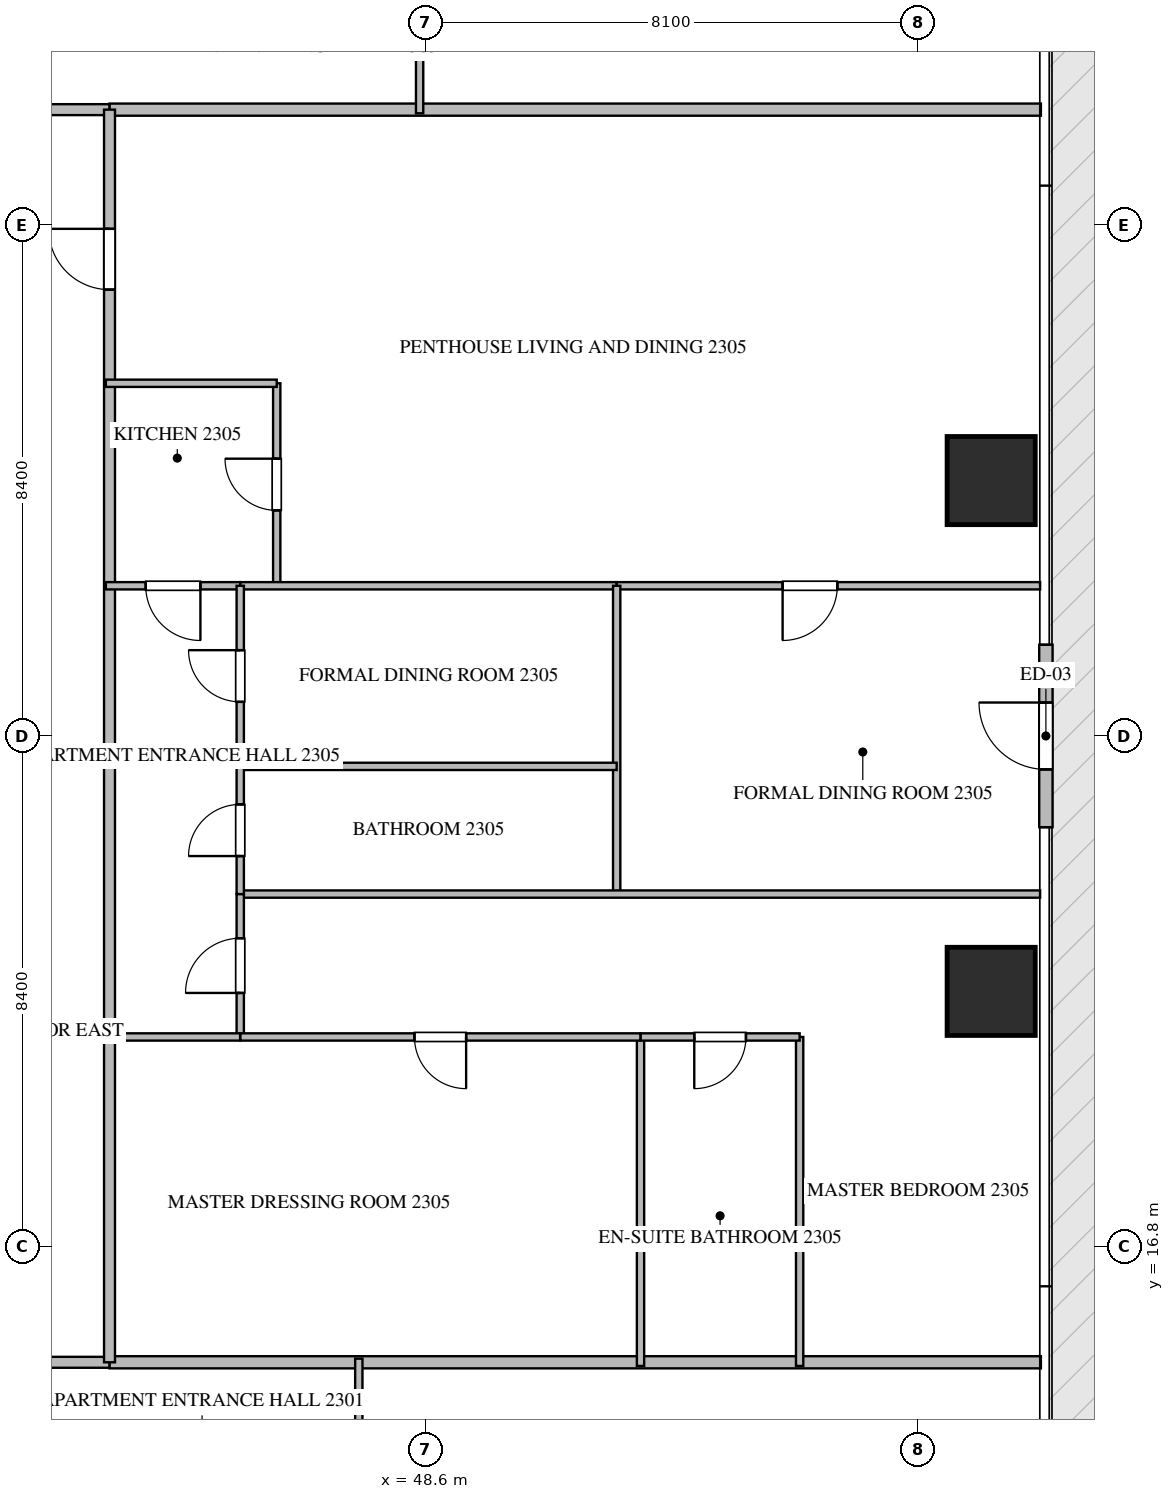
"""IFC4 building model, lengths in metres.
Left out: names, types, materials, properties, quantities, classifications, styles, units other than length and angle.
Written with IfcOpenShell. Run it as: python <this file> out.ifc"""

import sys

from ifc_helpers import new_model, si_unit, direction, frame, frame_2d, origin, origin_2d, place, context, subcontext, project, spatial, rectangle, extrude, source, transform, mapped, element, fill, save


model = new_model("IFC4")
c1 = context("Model", 3, precision=1e-05, world=origin(), true_north=direction((0.0, 1.0)))
c2 = subcontext(c1, "Body", "Model", "MODEL_VIEW")
j1 = project(units=[si_unit("LENGTHUNIT", "METRE"), si_unit("PLANEANGLEUNIT", "RADIAN")], contexts=[c1])
p1 = place(None, origin())
s1 = spatial("IfcSite", under=j1, at=p1, CompositionType="ELEMENT")
p2 = place(p1, origin())
s2 = spatial("IfcBuilding", under=s1, at=p2, CompositionType="ELEMENT")
p3 = place(p2, frame((0.0, 0.0, 94.2)))
s3 = spatial("IfcBuildingStorey", under=s2, at=p3, CompositionType="ELEMENT", Elevation=94.2)
m1 = source(origin(), c2, "Body", "SweptSolid", [
    extrude(rectangle(XDim=1.45, YDim=1.45, at=origin_2d()), origin(), (0.0, 0.0, 1.0), 3.75),
])
for number, where, z_axis, x_axis in (
    (1, (57.9, 21.0, -0.26), (0.0, 0.0, 1.0), (1.0, 0.0, 0.0)),
    (2, (57.9, 29.4, -0.26), (0.0, 0.0, 1.0), (1.0, 0.0, 0.0)),
):
    element("IfcColumn", number, at=place(p3, frame(where, z_axis=z_axis, x_axis=x_axis)), inside=s3, PredefinedType="COLUMN", context=c2, shape_type="MappedRepresentation", body=[
        mapped(m1, transform((0.0, 0.0, 0.0), scale=1.0)),
    ])
p4 = place(p3, frame((58.8, 23.7, 0.0), z_axis=(0.0, 0.0, 1.0), x_axis=(0.0, 1.0, 0.0)))
e3 = element("IfcWall", 3, at=p4, inside=s3, PredefinedType="ELEMENTEDWALL", context=c2, shape_type="SweptSolid", body=[
    extrude(rectangle(XDim=3.0, YDim=0.22, at=frame_2d((1.5, 0.0))), origin(), (0.0, 0.0, 1.0), 3.475),
])
p5 = place(p4, frame((0.95, 0.0, 0.0)))
e4 = element("IfcOpeningElement", 4, at=p5, cuts=e3, PredefinedType="OPENING", context=c2, shape_type="SweptSolid", body=[
    extrude(rectangle(XDim=1.1, YDim=2.2, at=frame_2d((0.55, 1.1))), frame((0.0, 0.12, 0.0), z_axis=(0.0, -1.0, 0.0), x_axis=(1.0, 0.0, 0.0)), (0.0, 0.0, 1.0), 0.24),
])
for number, where, z_axis, x_axis in (
    (5, (43.4, 14.9, 0.0), (0.0, 0.0, 1.0), (1.0, 0.0, 0.0)),
    (6, (43.4, 35.5, 0.0), (0.0, 0.0, 1.0), (1.0, 0.0, 0.0)),
):
    element("IfcWall", number, at=place(p3, frame(where, z_axis=z_axis, x_axis=x_axis)), inside=s3, PredefinedType="PARTITIONING", context=c2, shape_type="SweptSolid", body=[
        extrude(rectangle(XDim=15.318, YDim=0.2, at=frame_2d((7.659, 0.0))), origin(), (0.0, 0.0, 1.0), 3.49),
    ])
p6 = place(p3, frame((21.402, 14.9, 0.0), z_axis=(0.0, 0.0, 1.0), x_axis=(1.0, 0.0, 0.0)))
e7 = element("IfcWall", 7, at=p6, inside=s3, PredefinedType="PARTITIONING", context=c2, shape_type="SweptSolid", body=[
    extrude(rectangle(XDim=21.996, YDim=0.18, at=frame_2d((10.998, 0.0))), origin(), (0.0, 0.0, 1.0), 3.49),
])
p7 = place(p6, frame((15.222, 0.0, 0.0)))
e8 = element("IfcOpeningElement", 8, at=p7, cuts=e7, PredefinedType="OPENING", context=c2, shape_type="SweptSolid", body=[
    extrude(rectangle(XDim=1.0, YDim=2.15, at=frame_2d((0.5, 1.075))), frame((0.0, 0.1, 0.0), z_axis=(0.0, -1.0, 0.0), x_axis=(1.0, 0.0, 0.0)), (0.0, 0.0, 1.0), 0.2),
])
p8 = place(p3, frame((21.402, 35.5, 0.0), z_axis=(0.0, 0.0, 1.0), x_axis=(1.0, 0.0, 0.0)))
e9 = element("IfcWall", 9, at=p8, inside=s3, PredefinedType="PARTITIONING", context=c2, shape_type="SweptSolid", body=[
    extrude(rectangle(XDim=21.996, YDim=0.18, at=frame_2d((10.998, 0.0))), origin(), (0.0, 0.0, 1.0), 3.49),
])
p9 = place(p8, frame((7.454, 0.0, 0.0)))
e10 = element("IfcOpeningElement", 10, at=p9, cuts=e9, PredefinedType="OPENING", context=c2, shape_type="SweptSolid", body=[
    extrude(rectangle(XDim=1.0, YDim=2.15, at=frame_2d((0.5, 1.075))), frame((0.0, 0.1, 0.0), z_axis=(0.0, -1.0, 0.0), x_axis=(1.0, 0.0, 0.0)), (0.0, 0.0, 1.0), 0.2),
])
p10 = place(p8, frame((13.542, 0.0, 0.0)))
e11 = element("IfcOpeningElement", 11, at=p10, cuts=e9, PredefinedType="OPENING", context=c2, shape_type="SweptSolid", body=[
    extrude(rectangle(XDim=1.0, YDim=2.15, at=frame_2d((0.5, 1.075))), frame((0.0, 0.1, 0.0), z_axis=(0.0, -1.0, 0.0), x_axis=(1.0, 0.0, 0.0)), (0.0, 0.0, 1.0), 0.2),
])
p11 = place(p3, frame((43.4, 14.9, 0.0), z_axis=(0.0, 0.0, 1.0), x_axis=(0.0, 1.0, 0.0)))
e12 = element("IfcWall", 12, at=p11, inside=s3, PredefinedType="PARTITIONING", context=c2, shape_type="SweptSolid", body=[
    extrude(rectangle(XDim=20.6, YDim=0.18, at=frame_2d((10.3, 0.0))), origin(), (0.0, 0.0, 1.0), 3.49),
])
p12 = place(p11, frame((17.64, 0.0, 0.0)))
e13 = element("IfcOpeningElement", 13, at=p12, cuts=e12, PredefinedType="OPENING", context=c2, shape_type="SweptSolid", body=[
    extrude(rectangle(XDim=1.0, YDim=2.15, at=frame_2d((0.5, 1.075))), frame((0.0, 0.1, 0.0), z_axis=(0.0, -1.0, 0.0), x_axis=(1.0, 0.0, 0.0)), (0.0, 0.0, 1.0), 0.2),
])
for number, where, z_axis, x_axis in (
    (14, (47.5, 12.752, 0.0), (0.0, 0.0, 1.0), (0.0, 1.0, 0.0)),
    (15, (48.5, 37.648, 0.0), (0.0, 0.0, 1.0), (0.0, -1.0, 0.0)),
):
    element("IfcWall", number, at=place(p3, frame(where, z_axis=z_axis, x_axis=x_axis)), inside=s3, PredefinedType="PARTITIONING", context=c2, shape_type="SweptSolid", body=[
        extrude(rectangle(XDim=2.208, YDim=0.12, at=frame_2d((1.104, 0.0))), origin(), (0.0, 0.0, 1.0), 3.49),
    ])
p13 = place(p3, frame((46.15, 27.67, 0.0), z_axis=(0.0, 0.0, 1.0), x_axis=(0.0, 1.0, 0.0)))
e16 = element("IfcWall", 16, at=p13, inside=s3, PredefinedType="PARTITIONING", context=c2, shape_type="SweptSolid", body=[
    extrude(rectangle(XDim=3.33, YDim=0.12, at=frame_2d((1.665, 0.0))), origin(), (0.0, 0.0, 1.0), 3.49),
])
p14 = place(p13, frame((1.24, 0.0, 0.0)))
e17 = element("IfcOpeningElement", 17, at=p14, cuts=e16, PredefinedType="OPENING", context=c2, shape_type="SweptSolid", body=[
    extrude(rectangle(XDim=0.85, YDim=2.1, at=frame_2d((0.425, 1.05))), frame((0.0, 0.07, 0.0), z_axis=(0.0, -1.0, 0.0), x_axis=(1.0, 0.0, 0.0)), (0.0, 0.0, 1.0), 0.14),
])
p15 = place(p3, frame((46.15, 31.0, 0.0), z_axis=(0.0, 0.0, 1.0), x_axis=(-1.0, 0.0, 0.0)))
e18 = element("IfcWall", 18, at=p15, inside=s3, PredefinedType="PARTITIONING", context=c2, shape_type="SweptSolid", body=[
    extrude(rectangle(XDim=2.81, YDim=0.12, at=frame_2d((1.405, 0.0))), origin(), (0.0, 0.0, 1.0), 3.49),
])
p16 = place(p3, frame((45.55, 27.67, 0.0), z_axis=(0.0, 0.0, 1.0), x_axis=(-1.0, 0.0, 0.0)))
e19 = element("IfcWall", 19, at=p16, inside=s3, PredefinedType="PARTITIONING", context=c2, shape_type="SweptSolid", body=[
    extrude(rectangle(XDim=2.21, YDim=0.12, at=frame_2d((1.105, 0.0))), origin(), (0.0, 0.0, 1.0), 3.49),
])
p17 = place(p16, frame((0.655, 0.0, 0.0)))
e20 = element("IfcOpeningElement", 20, at=p17, cuts=e19, PredefinedType="OPENING", context=c2, shape_type="SweptSolid", body=[
    extrude(rectangle(XDim=0.9, YDim=2.1, at=frame_2d((0.45, 1.05))), frame((0.0, 0.07, 0.0), z_axis=(0.0, -1.0, 0.0), x_axis=(1.0, 0.0, 0.0)), (0.0, 0.0, 1.0), 0.14),
])
p18 = place(p3, frame((58.705, 27.67, 0.0), z_axis=(0.0, 0.0, 1.0), x_axis=(-1.0, 0.0, 0.0)))
e21 = element("IfcWall", 21, at=p18, inside=s3, PredefinedType="PARTITIONING", context=c2, shape_type="SweptSolid", body=[
    extrude(rectangle(XDim=6.964, YDim=0.12, at=frame_2d((3.482, 0.0))), origin(), (0.0, 0.0, 1.0), 3.49),
])
p19 = place(p18, frame((3.335, 0.0, 0.0)))
e22 = element("IfcOpeningElement", 22, at=p19, cuts=e21, PredefinedType="OPENING", context=c2, shape_type="SweptSolid", body=[
    extrude(rectangle(XDim=0.9, YDim=2.1, at=frame_2d((0.45, 1.05))), frame((0.0, 0.07, 0.0), z_axis=(0.0, -1.0, 0.0), x_axis=(1.0, 0.0, 0.0)), (0.0, 0.0, 1.0), 0.14),
])
p20 = place(p3, frame((51.739, 27.67, 0.0), z_axis=(0.0, 0.0, 1.0), x_axis=(-1.0, 0.0, 0.0)))
e23 = element("IfcWall", 23, at=p20, inside=s3, PredefinedType="PARTITIONING", context=c2, shape_type="SweptSolid", body=[
    extrude(rectangle(XDim=6.187, YDim=0.12, at=frame_2d((3.094, 0.0))), origin(), (0.0, 0.0, 1.0), 3.49),
])
p21 = place(p3, frame((51.741, 22.6, 0.0), z_axis=(0.0, 0.0, 1.0), x_axis=(0.0, 1.0, 0.0)))
e24 = element("IfcWall", 24, at=p21, inside=s3, PredefinedType="PARTITIONING", context=c2, shape_type="SweptSolid", body=[
    extrude(rectangle(XDim=5.07, YDim=0.12, at=frame_2d((2.535, 0.0))), origin(), (0.0, 0.0, 1.0), 3.49),
])
p22 = place(p3, frame((58.705, 22.6, 0.0), z_axis=(0.0, 0.0, 1.0), x_axis=(-1.0, 0.0, 0.0)))
e25 = element("IfcWall", 25, at=p22, inside=s3, PredefinedType="PARTITIONING", context=c2, shape_type="SweptSolid", body=[
    extrude(rectangle(XDim=13.155, YDim=0.12, at=frame_2d((6.578, 0.0))), origin(), (0.0, 0.0, 1.0), 3.49),
])
p23 = place(p3, frame((51.741, 24.7, 0.0), z_axis=(0.0, 0.0, 1.0), x_axis=(-1.0, 0.0, 0.0)))
e26 = element("IfcWall", 26, at=p23, inside=s3, PredefinedType="PARTITIONING", context=c2, shape_type="SweptSolid", body=[
    extrude(rectangle(XDim=6.191, YDim=0.12, at=frame_2d((3.095, 0.0))), origin(), (0.0, 0.0, 1.0), 3.49),
])
p24 = place(p3, frame((45.55, 22.6, 0.0), z_axis=(0.0, 0.0, 1.0), x_axis=(0.0, 1.0, 0.0)))
e27 = element("IfcWall", 27, at=p24, inside=s3, PredefinedType="PARTITIONING", context=c2, shape_type="SweptSolid", body=[
    extrude(rectangle(XDim=2.1, YDim=0.12, at=frame_2d((1.05, 0.0))), origin(), (0.0, 0.0, 1.0), 3.49),
])
p25 = place(p24, frame((0.625, 0.0, 0.0)))
e28 = element("IfcOpeningElement", 28, at=p25, cuts=e27, PredefinedType="OPENING", context=c2, shape_type="SweptSolid", body=[
    extrude(rectangle(XDim=0.85, YDim=2.1, at=frame_2d((0.425, 1.05))), frame((0.0, 0.07, 0.0), z_axis=(0.0, -1.0, 0.0), x_axis=(1.0, 0.0, 0.0)), (0.0, 0.0, 1.0), 0.14),
])
p26 = place(p3, frame((45.55, 24.702, 0.0), z_axis=(0.0, 0.0, 1.0), x_axis=(0.0, 1.0, 0.0)))
e29 = element("IfcWall", 29, at=p26, inside=s3, PredefinedType="PARTITIONING", context=c2, shape_type="SweptSolid", body=[
    extrude(rectangle(XDim=2.968, YDim=0.12, at=frame_2d((1.484, 0.0))), origin(), (0.0, 0.0, 1.0), 3.49),
])
p27 = place(p26, frame((1.059, 0.0, 0.0)))
e30 = element("IfcOpeningElement", 30, at=p27, cuts=e29, PredefinedType="OPENING", context=c2, shape_type="SweptSolid", body=[
    extrude(rectangle(XDim=0.85, YDim=2.1, at=frame_2d((0.425, 1.05))), frame((0.0, 0.07, 0.0), z_axis=(0.0, -1.0, 0.0), x_axis=(1.0, 0.0, 0.0)), (0.0, 0.0, 1.0), 0.14),
])
p28 = place(p3, frame((45.55, 20.25, 0.0), z_axis=(0.0, 0.0, 1.0), x_axis=(0.0, 1.0, 0.0)))
e31 = element("IfcWall", 31, at=p28, inside=s3, PredefinedType="PARTITIONING", context=c2, shape_type="SweptSolid", body=[
    extrude(rectangle(XDim=2.348, YDim=0.12, at=frame_2d((1.174, 0.0))), origin(), (0.0, 0.0, 1.0), 3.49),
])
p29 = place(p28, frame((0.724, 0.0, 0.0)))
e32 = element("IfcOpeningElement", 32, at=p29, cuts=e31, PredefinedType="OPENING", context=c2, shape_type="SweptSolid", body=[
    extrude(rectangle(XDim=0.9, YDim=2.1, at=frame_2d((0.45, 1.05))), frame((0.0, 0.07, 0.0), z_axis=(0.0, -1.0, 0.0), x_axis=(1.0, 0.0, 0.0)), (0.0, 0.0, 1.0), 0.14),
])
for number, where, z_axis, x_axis in (
    (33, (54.75, 14.84, 0.0), (0.0, 0.0, 1.0), (0.0, 1.0, 0.0)),
    (34, (52.133, 14.84, 0.0), (0.0, 0.0, 1.0), (0.0, 1.0, 0.0)),
):
    element("IfcWall", number, at=place(p3, frame(where, z_axis=z_axis, x_axis=x_axis)), inside=s3, PredefinedType="PARTITIONING", context=c2, shape_type="SweptSolid", body=[
        extrude(rectangle(XDim=5.41, YDim=0.12, at=frame_2d((2.705, 0.0))), origin(), (0.0, 0.0, 1.0), 3.49),
    ])
p30 = place(p3, frame((54.75, 20.25, 0.0), z_axis=(0.0, 0.0, 1.0), x_axis=(-1.0, 0.0, 0.0)))
e35 = element("IfcWall", 35, at=p30, inside=s3, PredefinedType="PARTITIONING", context=c2, shape_type="SweptSolid", body=[
    extrude(rectangle(XDim=2.617, YDim=0.12, at=frame_2d((1.309, 0.0))), origin(), (0.0, 0.0, 1.0), 3.49),
])
p31 = place(p30, frame((0.883, 0.0, 0.0)))
e36 = element("IfcOpeningElement", 36, at=p31, cuts=e35, PredefinedType="OPENING", context=c2, shape_type="SweptSolid", body=[
    extrude(rectangle(XDim=0.85, YDim=2.1, at=frame_2d((0.425, 1.05))), frame((0.0, 0.07, 0.0), z_axis=(0.0, -1.0, 0.0), x_axis=(1.0, 0.0, 0.0)), (0.0, 0.0, 1.0), 0.14),
])
p32 = place(p3, frame((52.131, 20.25, 0.0), z_axis=(0.0, 0.0, 1.0), x_axis=(-1.0, 0.0, 0.0)))
e37 = element("IfcWall", 37, at=p32, inside=s3, PredefinedType="PARTITIONING", context=c2, shape_type="SweptSolid", body=[
    extrude(rectangle(XDim=6.581, YDim=0.12, at=frame_2d((3.291, 0.0))), origin(), (0.0, 0.0, 1.0), 3.49),
])
p33 = place(p32, frame((2.866, 0.0, 0.0)))
e38 = element("IfcOpeningElement", 38, at=p33, cuts=e37, PredefinedType="OPENING", context=c2, shape_type="SweptSolid", body=[
    extrude(rectangle(XDim=0.85, YDim=2.1, at=frame_2d((0.425, 1.05))), frame((0.0, 0.07, 0.0), z_axis=(0.0, -1.0, 0.0), x_axis=(1.0, 0.0, 0.0)), (0.0, 0.0, 1.0), 0.14),
])
p34 = place(p3, frame((45.548, 20.25, 0.0), z_axis=(0.0, 0.0, 1.0), x_axis=(-1.0, 0.0, 0.0)))
e39 = element("IfcWall", 39, at=p34, inside=s3, PredefinedType="PARTITIONING", context=c2, shape_type="SweptSolid", body=[
    extrude(rectangle(XDim=2.208, YDim=0.12, at=frame_2d((1.104, 0.0))), origin(), (0.0, 0.0, 1.0), 3.49),
])
m2 = source(origin(), c2, "Body", "SweptSolid", [
    extrude(rectangle(XDim=1.1, YDim=2.2, at=frame_2d((0.55, 1.1))), frame((0.0, 0.025, 0.0), z_axis=(0.0, -1.0, 0.0), x_axis=(1.0, 0.0, 0.0)), (0.0, 0.0, 1.0), 0.05),
])
p35 = place(p5, origin())
e40 = element("IfcDoor", 40, at=p35, inside=s3, OperationType="SINGLE_SWING_RIGHT", PredefinedType="DOOR", context=c2, shape_type="MappedRepresentation", body=[
    mapped(m2, transform((0.0, 0.0, 0.0), scale=1.0)),
])
fill(e4, e40)
m3 = source(origin(), c2, "Body", "SweptSolid", [
    extrude(rectangle(XDim=1.0, YDim=2.15, at=frame_2d((0.5, 1.075))), frame((0.0, 0.025, 0.0), z_axis=(0.0, -1.0, 0.0), x_axis=(1.0, 0.0, 0.0)), (0.0, 0.0, 1.0), 0.05),
])
p36 = place(p12, origin())
e41 = element("IfcDoor", 41, at=p36, inside=s3, OperationType="SINGLE_SWING_RIGHT", PredefinedType="DOOR", context=c2, shape_type="MappedRepresentation", body=[
    mapped(m3, transform((0.0, 0.0, 0.0), scale=1.0)),
])
fill(e13, e41)
m4 = source(origin(), c2, "Body", "SweptSolid", [
    extrude(rectangle(XDim=0.85, YDim=2.1, at=frame_2d((0.425, 1.05))), frame((0.0, 0.025, 0.0), z_axis=(0.0, -1.0, 0.0), x_axis=(1.0, 0.0, 0.0)), (0.0, 0.0, 1.0), 0.05),
])
p37 = place(p14, origin())
e42 = element("IfcDoor", 42, at=p37, inside=s3, OperationType="SINGLE_SWING_RIGHT", PredefinedType="DOOR", context=c2, shape_type="MappedRepresentation", body=[
    mapped(m4, transform((0.0, 0.0, 0.0), scale=1.0)),
])
fill(e17, e42)
m5 = source(origin(), c2, "Body", "SweptSolid", [
    extrude(rectangle(XDim=0.9, YDim=2.1, at=frame_2d((0.45, 1.05))), frame((0.0, 0.025, 0.0), z_axis=(0.0, -1.0, 0.0), x_axis=(1.0, 0.0, 0.0)), (0.0, 0.0, 1.0), 0.05),
])
p38 = place(p17, origin())
e43 = element("IfcDoor", 43, at=p38, inside=s3, OperationType="SINGLE_SWING_LEFT", PredefinedType="DOOR", context=c2, shape_type="MappedRepresentation", body=[
    mapped(m5, transform((0.0, 0.0, 0.0), scale=1.0)),
])
fill(e20, e43)
p39 = place(p19, origin())
e44 = element("IfcDoor", 44, at=p39, inside=s3, OperationType="SINGLE_SWING_RIGHT", PredefinedType="DOOR", context=c2, shape_type="MappedRepresentation", body=[
    mapped(m5, transform((0.0, 0.0, 0.0), scale=1.0)),
])
fill(e22, e44)
p40 = place(p25, origin())
e45 = element("IfcDoor", 45, at=p40, inside=s3, OperationType="SINGLE_SWING_LEFT", PredefinedType="DOOR", context=c2, shape_type="MappedRepresentation", body=[
    mapped(m4, transform((0.0, 0.0, 0.0), scale=1.0)),
])
fill(e28, e45)
p41 = place(p27, origin())
e46 = element("IfcDoor", 46, at=p41, inside=s3, OperationType="SINGLE_SWING_RIGHT", PredefinedType="DOOR", context=c2, shape_type="MappedRepresentation", body=[
    mapped(m4, transform((0.0, 0.0, 0.0), scale=1.0)),
])
fill(e30, e46)
p42 = place(p29, origin())
e47 = element("IfcDoor", 47, at=p42, inside=s3, OperationType="SINGLE_SWING_LEFT", PredefinedType="DOOR", context=c2, shape_type="MappedRepresentation", body=[
    mapped(m5, transform((0.0, 0.0, 0.0), scale=1.0)),
])
fill(e32, e47)
p43 = place(p31, origin())
e48 = element("IfcDoor", 48, at=p43, inside=s3, OperationType="SINGLE_SWING_RIGHT", PredefinedType="DOOR", context=c2, shape_type="MappedRepresentation", body=[
    mapped(m4, transform((0.0, 0.0, 0.0), scale=1.0)),
])
fill(e36, e48)
p44 = place(p33, origin())
e49 = element("IfcDoor", 49, at=p44, inside=s3, OperationType="SINGLE_SWING_LEFT", PredefinedType="DOOR", context=c2, shape_type="MappedRepresentation", body=[
    mapped(m4, transform((0.0, 0.0, 0.0), scale=1.0)),
])
fill(e38, e49)
save(model, sys.argv[1])
